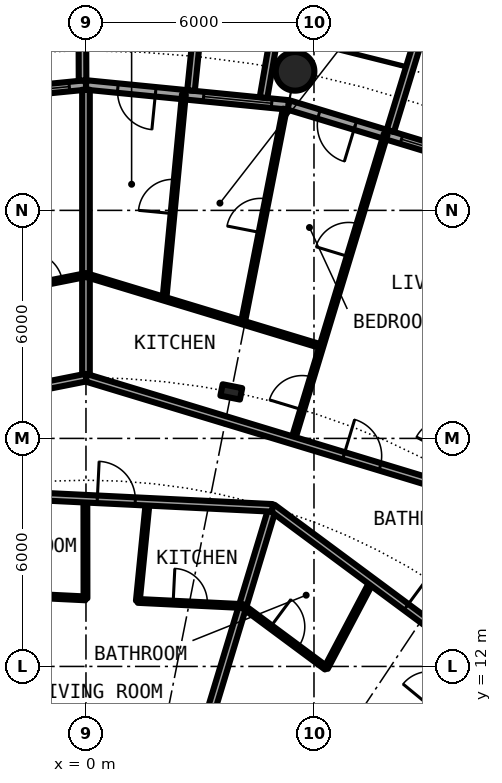
"""IFC4 building model, lengths in metres.
Left out: names, types, materials, properties, quantities, classifications, styles, units other than length and angle.
Written with IfcOpenShell. Run it as: python <this file> out.ifc"""

import sys

from ifc_helpers import new_model, si_unit, direction, frame, frame_2d, origin, origin_2d, place, context, subcontext, project, spatial, rectangle, circle, hollow_circle, i_section, extrude, element, fill, save


model = new_model("IFC4")
c1 = context("Model", 3, precision=1e-05, world=origin(), true_north=direction((0.0, 1.0)))
c2 = subcontext(c1, "Body", "Model", "MODEL_VIEW")
j1 = project(units=[si_unit("LENGTHUNIT", "METRE"), si_unit("PLANEANGLEUNIT", "RADIAN")], contexts=[c1])
p1 = place(None, origin())
s1 = spatial("IfcSite", under=j1, at=p1, CompositionType="ELEMENT")
p2 = place(p1, origin())
s2 = spatial("IfcBuilding", under=s1, at=p2, CompositionType="ELEMENT")
p3 = place(p2, frame((0.0, 0.0, 91.05)))
s3 = spatial("IfcBuildingStorey", under=s2, at=p3, CompositionType="ELEMENT", Elevation=91.05)
p4 = place(p3, frame((5.501, 27.658, 0.0), z_axis=(0.0, 0.0, 1.0), x_axis=(1.0, 0.0, 0.0)))
e1 = element("IfcColumn", 1, at=p4, inside=s3, PredefinedType="COLUMN", context=c2, shape_type="SweptSolid", body=[
    extrude(hollow_circle(Radius=0.508, WallThickness=0.04, at=origin_2d()), origin(), (0.0, 0.0, 1.0), 3.05),
])
p5 = place(p3, frame((3.824, 19.223, 0.0), z_axis=(0.0, 0.0, 1.0), x_axis=(0.195090322016, 0.980785280403, 0.0)))
e2 = element("IfcColumn", 2, at=p5, inside=s3, PredefinedType="COLUMN", context=c2, shape_type="SweptSolid", body=[
    extrude(i_section(OverallWidth=0.306, OverallDepth=0.524, WebThickness=0.021, FlangeThickness=0.04, FilletRadius=0.027, at=origin_2d()), origin(), (0.0, 0.0, 1.0), 3.05),
])
p6 = place(p3, frame((10.447, 25.222, 0.0), z_axis=(0.0, 0.0, 1.0), x_axis=(-0.956965678721, 0.290201119486, 0.0)))
e3 = element("IfcWall", 3, at=p6, inside=s3, PredefinedType="SOLIDWALL", context=c2, shape_type="SweptSolid", body=[
    extrude(rectangle(XDim=5.351, YDim=0.25, at=frame_2d((2.676, 0.0))), origin(), (0.0, 0.0, 1.0), 2.7),
])
p7 = place(p6, frame((0.441, 0.0, 0.3)))
e4 = element("IfcOpeningElement", 4, at=p7, cuts=e3, PredefinedType="OPENING", context=c2, shape_type="SweptSolid", body=[
    extrude(rectangle(XDim=1.8, YDim=2.1, at=frame_2d((0.9, 1.05))), frame((0.0, 0.135, 0.0), z_axis=(0.0, -1.0, 0.0), x_axis=(1.0, 0.0, 0.0)), (0.0, 0.0, 1.0), 0.27),
])
p8 = place(p6, frame((3.51, 0.0, 0.0)))
e5 = element("IfcOpeningElement", 5, at=p8, cuts=e3, PredefinedType="OPENING", context=c2, shape_type="SweptSolid", body=[
    extrude(rectangle(XDim=1.0, YDim=2.2, at=frame_2d((0.5, 1.1))), frame((0.0, 0.135, 0.0), z_axis=(0.0, -1.0, 0.0), x_axis=(1.0, 0.0, 0.0)), (0.0, 0.0, 1.0), 0.27),
])
p9 = place(p3, frame((11.638, 28.084, -0.03), z_axis=(0.0, 0.0, 1.0), x_axis=(-0.941461077774, 0.337121697664, 0.0)))
e6 = element("IfcWall", 6, at=p9, inside=s3, PredefinedType="SOLIDWALL", context=c2, shape_type="SweptSolid", body=[
    extrude(rectangle(XDim=2.993, YDim=0.2, at=frame_2d((1.497, 0.0))), origin(), (0.0, 0.0, 1.0), 2.73),
])
p10 = place(p9, frame((0.457, 0.0, 0.33)))
e7 = element("IfcOpeningElement", 7, at=p10, cuts=e6, PredefinedType="OPENING", context=c2, shape_type="SweptSolid", body=[
    extrude(circle(Radius=1.04, at=frame_2d((1.04, 1.04))), frame((0.0, 0.11, 0.0), z_axis=(0.0, -1.0, 0.0), x_axis=(1.0, 0.0, 0.0)), (0.0, 0.0, 1.0), 0.22),
])
p11 = place(p3, frame((8.009, 26.092, -0.03), z_axis=(0.0, 0.0, 1.0), x_axis=(0.293406695073, 0.955987715029, 0.0)))
e8 = element("IfcWall", 8, at=p11, inside=s3, PredefinedType="SOLIDWALL", context=c2, shape_type="SweptSolid", body=[
    extrude(rectangle(XDim=3.006, YDim=0.2, at=frame_2d((1.503, 0.0))), origin(), (0.0, 0.0, 1.0), 2.73),
])
p12 = place(p3, frame((5.326, 26.775, 0.0), z_axis=(0.0, 0.0, 1.0), x_axis=(-0.995173996315, 0.098126026407, 0.0)))
e9 = element("IfcWall", 9, at=p12, inside=s3, PredefinedType="SOLIDWALL", context=c2, shape_type="SweptSolid", body=[
    extrude(rectangle(XDim=5.352, YDim=0.25, at=frame_2d((2.676, 0.0))), origin(), (0.0, 0.0, 1.0), 2.7),
])
p13 = place(p12, frame((0.441, 0.0, 0.3)))
e10 = element("IfcOpeningElement", 10, at=p13, cuts=e9, PredefinedType="OPENING", context=c2, shape_type="SweptSolid", body=[
    extrude(rectangle(XDim=1.8, YDim=2.1, at=frame_2d((0.9, 1.05))), frame((0.0, 0.135, 0.0), z_axis=(0.0, -1.0, 0.0), x_axis=(1.0, 0.0, 0.0)), (0.0, 0.0, 1.0), 0.27),
])
p14 = place(p12, frame((3.51, 0.0, 0.0)))
e11 = element("IfcOpeningElement", 11, at=p14, cuts=e9, PredefinedType="OPENING", context=c2, shape_type="SweptSolid", body=[
    extrude(rectangle(XDim=1.0, YDim=2.2, at=frame_2d((0.5, 1.1))), frame((0.0, 0.135, 0.0), z_axis=(0.0, -1.0, 0.0), x_axis=(1.0, 0.0, 0.0)), (0.0, 0.0, 1.0), 0.27),
])
p15 = place(p3, frame((4.671, 26.966, -0.03), z_axis=(0.0, 0.0, 1.0), x_axis=(0.170539878907, 0.985350774954, 0.0)))
e12 = element("IfcWall", 12, at=p15, inside=s3, PredefinedType="SOLIDWALL", context=c2, shape_type="SweptSolid", body=[
    extrude(rectangle(XDim=2.932, YDim=0.2, at=frame_2d((1.466, 0.0))), origin(), (0.0, 0.0, 1.0), 2.73),
])
p16 = place(p3, frame((2.764, 27.153, -0.03), z_axis=(0.0, 0.0, 1.0), x_axis=(0.101505487237, 0.994834979311, 0.0)))
e13 = element("IfcWall", 13, at=p16, inside=s3, PredefinedType="SOLIDWALL", context=c2, shape_type="SweptSolid", body=[
    extrude(rectangle(XDim=3.007, YDim=0.2, at=frame_2d((1.503, 0.0))), origin(), (0.0, 0.0, 1.0), 2.73),
])
p17 = place(p3, frame((0.0, 27.3, 0.0), z_axis=(0.0, 0.0, 1.0), x_axis=(-0.995173996315, -0.098126026407, 0.0)))
e14 = element("IfcWall", 14, at=p17, inside=s3, PredefinedType="SOLIDWALL", context=c2, shape_type="SweptSolid", body=[
    extrude(rectangle(XDim=5.352, YDim=0.25, at=frame_2d((2.676, 0.0))), origin(), (0.0, 0.0, 1.0), 2.7),
])
p18 = place(p17, frame((0.441, 0.0, 0.3)))
e15 = element("IfcOpeningElement", 15, at=p18, cuts=e14, PredefinedType="OPENING", context=c2, shape_type="SweptSolid", body=[
    extrude(rectangle(XDim=1.8, YDim=2.1, at=frame_2d((0.9, 1.05))), frame((0.0, 0.135, 0.0), z_axis=(0.0, -1.0, 0.0), x_axis=(1.0, 0.0, 0.0)), (0.0, 0.0, 1.0), 0.27),
])
p19 = place(p17, frame((3.51, 0.0, 0.0)))
e16 = element("IfcOpeningElement", 16, at=p19, cuts=e14, PredefinedType="OPENING", context=c2, shape_type="SweptSolid", body=[
    extrude(rectangle(XDim=1.0, YDim=2.2, at=frame_2d((0.5, 1.1))), frame((0.0, 0.135, 0.0), z_axis=(0.0, -1.0, 0.0), x_axis=(1.0, 0.0, 0.0)), (0.0, 0.0, 1.0), 0.27),
])
p20 = place(p3, frame((-0.09, 27.417, -0.03), z_axis=(0.0, 0.0, 1.0), x_axis=(-0.00347308367, 0.999993968827, 0.0)))
e17 = element("IfcWall", 17, at=p20, inside=s3, PredefinedType="SOLIDWALL", context=c2, shape_type="SweptSolid", body=[
    extrude(rectangle(XDim=2.882, YDim=0.2, at=frame_2d((1.441, 0.0))), origin(), (0.0, 0.0, 1.0), 2.73),
])
p21 = place(p3, frame((-0.013, 13.792, 0.0), z_axis=(0.0, 0.0, 1.0), x_axis=(-0.001210427419, 0.999999267432, 0.0)))
e18 = element("IfcWall", 18, at=p21, inside=s3, PredefinedType="PARTITIONING", context=c2, shape_type="SweptSolid", body=[
    extrude(rectangle(XDim=2.622, YDim=0.1, at=frame_2d((1.311, 0.0))), origin(), (0.0, 0.0, 1.0), 2.7),
])
p22 = place(p3, frame((0.0, 19.6, 0.0), z_axis=(0.0, 0.0, 1.0), x_axis=(0.0, 1.0, 0.0)))
e19 = element("IfcWall", 19, at=p22, inside=s3, PredefinedType="PARTITIONING", context=c2, shape_type="SweptSolid", body=[
    extrude(rectangle(XDim=7.575, YDim=0.2, at=frame_2d((3.788, 0.0))), origin(), (0.0, 0.0, 1.0), 2.7),
])
p23 = place(p3, frame((1.365, 13.724, 0.0), z_axis=(0.0, 0.0, 1.0), x_axis=(0.099171803948, 0.995070325807, 0.0)))
e20 = element("IfcWall", 20, at=p23, inside=s3, PredefinedType="PARTITIONING", context=c2, shape_type="SweptSolid", body=[
    extrude(rectangle(XDim=2.622, YDim=0.1, at=frame_2d((1.311, 0.0))), origin(), (0.0, 0.0, 1.0), 2.7),
])
p24 = place(p3, frame((2.065, 21.674, 0.0), z_axis=(0.0, 0.0, 1.0), x_axis=(0.094751520537, 0.99550095397, 0.0)))
e21 = element("IfcWall", 21, at=p24, inside=s3, PredefinedType="PARTITIONING", context=c2, shape_type="SweptSolid", body=[
    extrude(rectangle(XDim=5.403, YDim=0.1, at=frame_2d((2.702, 0.0))), origin(), (0.0, 0.0, 1.0), 2.7),
])
p25 = place(p24, frame((2.252, 0.0, 0.0)))
e22 = element("IfcOpeningElement", 22, at=p25, cuts=e21, PredefinedType="OPENING", context=c2, shape_type="SweptSolid", body=[
    extrude(rectangle(XDim=0.9, YDim=2.3, at=frame_2d((0.45, 1.15))), frame((0.0, 0.06, 0.0), z_axis=(0.0, -1.0, 0.0), x_axis=(1.0, 0.0, 0.0)), (0.0, 0.0, 1.0), 0.12),
])
p26 = place(p3, frame((2.243, 7.387, 0.0), z_axis=(0.0, 0.0, 1.0), x_axis=(0.290196345171, 0.956967126525, 0.0)))
e23 = element("IfcWall", 23, at=p26, inside=s3, PredefinedType="PARTITIONING", context=c2, shape_type="SweptSolid", body=[
    extrude(rectangle(XDim=9.18, YDim=0.2, at=frame_2d((4.59, 0.0))), origin(), (0.0, 0.0, 1.0), 2.7),
])
p27 = place(p3, frame((4.13, 21.047, 0.0), z_axis=(0.0, 0.0, 1.0), x_axis=(0.192433779325, 0.981309961518, 0.0)))
e24 = element("IfcWall", 24, at=p27, inside=s3, PredefinedType="PARTITIONING", context=c2, shape_type="SweptSolid", body=[
    extrude(rectangle(XDim=5.727, YDim=0.1, at=frame_2d((2.863, 0.0))), origin(), (0.0, 0.0, 1.0), 2.7),
])
p28 = place(p27, frame((2.414, 0.0, 0.0)))
e25 = element("IfcOpeningElement", 25, at=p28, cuts=e24, PredefinedType="OPENING", context=c2, shape_type="SweptSolid", body=[
    extrude(rectangle(XDim=0.9, YDim=2.3, at=frame_2d((0.45, 1.15))), frame((0.0, 0.06, 0.0), z_axis=(0.0, -1.0, 0.0), x_axis=(1.0, 0.0, 0.0)), (0.0, 0.0, 1.0), 0.12),
])
p29 = place(p3, frame((4.909, 5.958, 0.0), z_axis=(0.0, 0.0, 1.0), x_axis=(0.635976043025, 0.771708800454, 0.0)))
e26 = element("IfcWall", 26, at=p29, inside=s3, PredefinedType="PARTITIONING", context=c2, shape_type="SweptSolid", body=[
    extrude(rectangle(XDim=8.213, YDim=0.1, at=frame_2d((4.106, 0.0))), origin(), (0.0, 0.0, 1.0), 2.7),
])
p30 = place(p29, frame((6.49, 0.0, 0.0)))
e27 = element("IfcOpeningElement", 27, at=p30, cuts=e26, PredefinedType="OPENING", context=c2, shape_type="SweptSolid", body=[
    extrude(rectangle(XDim=0.9, YDim=2.3, at=frame_2d((0.45, 1.15))), frame((0.0, 0.06, 0.0), z_axis=(0.0, -1.0, 0.0), x_axis=(1.0, 0.0, 0.0)), (0.0, 0.0, 1.0), 0.12),
])
p31 = place(p29, frame((2.384, 0.0, 0.0)))
e28 = element("IfcOpeningElement", 28, at=p31, cuts=e26, PredefinedType="OPENING", context=c2, shape_type="SweptSolid", body=[
    extrude(rectangle(XDim=0.9, YDim=2.3, at=frame_2d((0.45, 1.15))), frame((0.0, 0.06, 0.0), z_axis=(0.0, -1.0, 0.0), x_axis=(1.0, 0.0, 0.0)), (0.0, 0.0, 1.0), 0.12),
])
p32 = place(p3, frame((5.445, 17.948, 0.0), z_axis=(0.0, 0.0, 1.0), x_axis=(0.290158700753, 0.956978541231, 0.0)))
e29 = element("IfcWall", 29, at=p32, inside=s3, PredefinedType="PARTITIONING", context=c2, shape_type="SweptSolid", body=[
    extrude(rectangle(XDim=8.419, YDim=0.1, at=frame_2d((4.209, 0.0))), origin(), (0.0, 0.0, 1.0), 2.7),
])
p33 = place(p32, frame((0.842, 0.0, 0.0)))
e30 = element("IfcOpeningElement", 30, at=p33, cuts=e29, PredefinedType="OPENING", context=c2, shape_type="SweptSolid", body=[
    extrude(rectangle(XDim=0.9, YDim=2.3, at=frame_2d((0.45, 1.15))), frame((0.0, 0.06, 0.0), z_axis=(0.0, -1.0, 0.0), x_axis=(1.0, 0.0, 0.0)), (0.0, 0.0, 1.0), 0.12),
])
p34 = place(p32, frame((5.052, 0.0, 0.0)))
e31 = element("IfcOpeningElement", 31, at=p34, cuts=e29, PredefinedType="OPENING", context=c2, shape_type="SweptSolid", body=[
    extrude(rectangle(XDim=0.9, YDim=2.3, at=frame_2d((0.45, 1.15))), frame((0.0, 0.06, 0.0), z_axis=(0.0, -1.0, 0.0), x_axis=(1.0, 0.0, 0.0)), (0.0, 0.0, 1.0), 0.12),
])
p35 = place(p3, frame((6.318, 11.96, 0.0), z_axis=(0.0, 0.0, 1.0), x_axis=(0.467001992543, 0.884256263173, 0.0)))
e32 = element("IfcWall", 32, at=p35, inside=s3, PredefinedType="PARTITIONING", context=c2, shape_type="SweptSolid", body=[
    extrude(rectangle(XDim=2.572, YDim=0.1, at=frame_2d((1.286, 0.0))), origin(), (0.0, 0.0, 1.0), 2.7),
])
p36 = place(p3, frame((4.122, 13.589, 0.0), z_axis=(0.0, 0.0, 1.0), x_axis=(0.803128348509, -0.595806055542, 0.0)))
e33 = element("IfcWall", 33, at=p36, inside=s3, PredefinedType="PARTITIONING", context=c2, shape_type="SweptSolid", body=[
    extrude(rectangle(XDim=2.734, YDim=0.1, at=frame_2d((1.367, 0.0))), origin(), (0.0, 0.0, 1.0), 2.7),
])
p37 = place(p36, frame((0.917, 0.0, 0.0)))
e34 = element("IfcOpeningElement", 34, at=p37, cuts=e33, PredefinedType="OPENING", context=c2, shape_type="SweptSolid", body=[
    extrude(rectangle(XDim=0.9, YDim=2.3, at=frame_2d((0.45, 1.15))), frame((0.0, 0.06, 0.0), z_axis=(0.0, -1.0, 0.0), x_axis=(1.0, 0.0, 0.0)), (0.0, 0.0, 1.0), 0.12),
])
p38 = place(p3, frame((-2.77, 13.926, 0.0), z_axis=(0.0, 0.0, 1.0), x_axis=(0.99880320044, -0.048909782152, 0.0)))
e35 = element("IfcWall", 35, at=p38, inside=s3, PredefinedType="PARTITIONING", context=c2, shape_type="SweptSolid", body=[
    extrude(rectangle(XDim=2.76, YDim=0.1, at=frame_2d((1.38, 0.0))), origin(), (0.0, 0.0, 1.0), 2.7),
])
p39 = place(p38, frame((0.93, 0.0, 0.0)))
e36 = element("IfcOpeningElement", 36, at=p39, cuts=e35, PredefinedType="OPENING", context=c2, shape_type="SweptSolid", body=[
    extrude(rectangle(XDim=0.9, YDim=2.3, at=frame_2d((0.45, 1.15))), frame((0.0, 0.06, 0.0), z_axis=(0.0, -1.0, 0.0), x_axis=(1.0, 0.0, 0.0)), (0.0, 0.0, 1.0), 0.12),
])
p40 = place(p3, frame((1.365, 13.724, 0.0), z_axis=(0.0, 0.0, 1.0), x_axis=(0.99880320044, -0.048909782152, 0.0)))
e37 = element("IfcWall", 37, at=p40, inside=s3, PredefinedType="PARTITIONING", context=c2, shape_type="SweptSolid", body=[
    extrude(rectangle(XDim=2.76, YDim=0.1, at=frame_2d((1.38, 0.0))), origin(), (0.0, 0.0, 1.0), 2.7),
])
p41 = place(p40, frame((0.93, 0.0, 0.0)))
e38 = element("IfcOpeningElement", 38, at=p41, cuts=e37, PredefinedType="OPENING", context=c2, shape_type="SweptSolid", body=[
    extrude(rectangle(XDim=0.9, YDim=2.3, at=frame_2d((0.45, 1.15))), frame((0.0, 0.06, 0.0), z_axis=(0.0, -1.0, 0.0), x_axis=(1.0, 0.0, 0.0)), (0.0, 0.0, 1.0), 0.12),
])
p42 = place(p3, frame((4.906, 16.172, 0.0), z_axis=(0.0, 0.0, 1.0), x_axis=(0.803191461888, -0.595720971219, 0.0)))
e39 = element("IfcWall", 39, at=p42, inside=s3, PredefinedType="PARTITIONING", context=c2, shape_type="SweptSolid", body=[
    extrude(rectangle(XDim=9.76, YDim=0.2, at=frame_2d((4.88, 0.0))), origin(), (0.0, 0.0, 1.0), 2.7),
])
p43 = place(p42, frame((4.38, 0.0, 0.0)))
e40 = element("IfcOpeningElement", 40, at=p43, cuts=e39, PredefinedType="OPENING", context=c2, shape_type="SweptSolid", body=[
    extrude(rectangle(XDim=1.0, YDim=2.3, at=frame_2d((0.5, 1.15))), frame((0.0, 0.11, 0.0), z_axis=(0.0, -1.0, 0.0), x_axis=(1.0, 0.0, 0.0)), (0.0, 0.0, 1.0), 0.22),
])
p44 = place(p3, frame((-3.298, 16.574, 0.0), z_axis=(0.0, 0.0, 1.0), x_axis=(0.998802523271, -0.048923608895, 0.0)))
e41 = element("IfcWall", 41, at=p44, inside=s3, PredefinedType="PARTITIONING", context=c2, shape_type="SweptSolid", body=[
    extrude(rectangle(XDim=8.214, YDim=0.2, at=frame_2d((4.107, 0.0))), origin(), (0.0, 0.0, 1.0), 2.7),
])
p45 = place(p44, frame((3.6, 0.0, 0.0)))
e42 = element("IfcOpeningElement", 42, at=p45, cuts=e41, PredefinedType="OPENING", context=c2, shape_type="SweptSolid", body=[
    extrude(rectangle(XDim=1.0, YDim=2.3, at=frame_2d((0.5, 1.15))), frame((0.0, 0.11, 0.0), z_axis=(0.0, -1.0, 0.0), x_axis=(1.0, 0.0, 0.0)), (0.0, 0.0, 1.0), 0.22),
])
p46 = place(p3, frame((-0.007, 19.599, 0.0), z_axis=(0.0, 0.0, 1.0), x_axis=(0.95700958731, -0.290056287291, 0.0)))
e43 = element("IfcWall", 43, at=p46, inside=s3, PredefinedType="PARTITIONING", context=c2, shape_type="SweptSolid", body=[
    extrude(rectangle(XDim=11.226, YDim=0.2, at=frame_2d((5.613, 0.0))), origin(), (0.0, 0.0, 1.0), 2.38),
])
p47 = place(p46, frame((7.093, 0.0, 0.0)))
e44 = element("IfcOpeningElement", 44, at=p47, cuts=e43, PredefinedType="OPENING", context=c2, shape_type="SweptSolid", body=[
    extrude(rectangle(XDim=1.0, YDim=2.3, at=frame_2d((0.5, 1.15))), frame((0.0, 0.11, 0.0), z_axis=(0.0, -1.0, 0.0), x_axis=(1.0, 0.0, 0.0)), (0.0, 0.0, 1.0), 0.22),
])
p48 = place(p3, frame((-7.501, 18.108, 0.0), z_axis=(0.0, 0.0, 1.0), x_axis=(0.980791233058, 0.195060393611, 0.0)))
e45 = element("IfcWall", 45, at=p48, inside=s3, PredefinedType="PARTITIONING", context=c2, shape_type="SweptSolid", body=[
    extrude(rectangle(XDim=7.65, YDim=0.2, at=frame_2d((3.825, 0.0))), origin(), (0.0, 0.0, 1.0), 2.38),
])
p49 = place(p48, frame((4.313, 0.0, 0.0)))
e46 = element("IfcOpeningElement", 46, at=p49, cuts=e45, PredefinedType="OPENING", context=c2, shape_type="SweptSolid", body=[
    extrude(rectangle(XDim=1.0, YDim=2.3, at=frame_2d((0.5, 1.15))), frame((0.0, 0.11, 0.0), z_axis=(0.0, -1.0, 0.0), x_axis=(1.0, 0.0, 0.0)), (0.0, 0.0, 1.0), 0.22),
])
p50 = place(p3, frame((-0.004, 22.299, 0.0), z_axis=(0.0, 0.0, 1.0), x_axis=(0.95699555343, -0.290102586537, 0.0)))
e47 = element("IfcWall", 47, at=p50, inside=s3, PredefinedType="PARTITIONING", context=c2, shape_type="SweptSolid", body=[
    extrude(rectangle(XDim=6.478, YDim=0.1, at=frame_2d((3.239, 0.0))), origin(), (0.0, 0.0, 1.0), 2.7),
])
p51 = place(p3, frame((-4.261, 21.452, 0.0), z_axis=(0.0, 0.0, 1.0), x_axis=(0.980819753929, 0.194916931799, 0.0)))
e48 = element("IfcWall", 48, at=p51, inside=s3, PredefinedType="PARTITIONING", context=c2, shape_type="SweptSolid", body=[
    extrude(rectangle(XDim=4.346, YDim=0.1, at=frame_2d((2.173, 0.0))), origin(), (0.0, 0.0, 1.0), 2.7),
])
p52 = place(p51, frame((2.807, 0.0, 0.0)))
e49 = element("IfcOpeningElement", 49, at=p52, cuts=e48, PredefinedType="OPENING", context=c2, shape_type="SweptSolid", body=[
    extrude(rectangle(XDim=0.9, YDim=2.3, at=frame_2d((0.45, 1.15))), frame((0.0, 0.06, 0.0), z_axis=(0.0, -1.0, 0.0), x_axis=(1.0, 0.0, 0.0)), (0.0, 0.0, 1.0), 0.12),
])
p53 = place(p7, origin())
e50 = element("IfcWindow", 50, at=p53, inside=s3, PartitioningType="SINGLE_PANEL", PredefinedType="WINDOW", context=c2, shape_type="SweptSolid", body=[
    extrude(rectangle(XDim=1.8, YDim=2.1, at=frame_2d((0.9, 1.05))), frame((0.0, 0.03, 0.0), z_axis=(0.0, -1.0, 0.0), x_axis=(1.0, 0.0, 0.0)), (0.0, 0.0, 1.0), 0.06),
])
fill(e4, e50)
p54 = place(p8, origin())
e51 = element("IfcDoor", 51, at=p54, inside=s3, OperationType="SINGLE_SWING_LEFT", PredefinedType="DOOR", context=c2, shape_type="SweptSolid", body=[
    extrude(rectangle(XDim=1.0, YDim=2.2, at=frame_2d((0.5, 1.1))), frame((0.0, 0.025, 0.0), z_axis=(0.0, -1.0, 0.0), x_axis=(1.0, 0.0, 0.0)), (0.0, 0.0, 1.0), 0.05),
])
fill(e5, e51)
p55 = place(p13, origin())
e52 = element("IfcWindow", 52, at=p55, inside=s3, PartitioningType="SINGLE_PANEL", PredefinedType="WINDOW", context=c2, shape_type="SweptSolid", body=[
    extrude(rectangle(XDim=1.8, YDim=2.1, at=frame_2d((0.9, 1.05))), frame((0.0, 0.03, 0.0), z_axis=(0.0, -1.0, 0.0), x_axis=(1.0, 0.0, 0.0)), (0.0, 0.0, 1.0), 0.06),
])
fill(e10, e52)
p56 = place(p14, origin())
e53 = element("IfcDoor", 53, at=p56, inside=s3, OperationType="SINGLE_SWING_LEFT", PredefinedType="DOOR", context=c2, shape_type="SweptSolid", body=[
    extrude(rectangle(XDim=1.0, YDim=2.2, at=frame_2d((0.5, 1.1))), frame((0.0, 0.025, 0.0), z_axis=(0.0, -1.0, 0.0), x_axis=(1.0, 0.0, 0.0)), (0.0, 0.0, 1.0), 0.05),
])
fill(e11, e53)
p57 = place(p18, origin())
e54 = element("IfcWindow", 54, at=p57, inside=s3, PartitioningType="SINGLE_PANEL", PredefinedType="WINDOW", context=c2, shape_type="SweptSolid", body=[
    extrude(rectangle(XDim=1.8, YDim=2.1, at=frame_2d((0.9, 1.05))), frame((0.0, 0.03, 0.0), z_axis=(0.0, -1.0, 0.0), x_axis=(1.0, 0.0, 0.0)), (0.0, 0.0, 1.0), 0.06),
])
fill(e15, e54)
p58 = place(p47, origin())
e55 = element("IfcDoor", 55, at=p58, inside=s3, OperationType="SINGLE_SWING_RIGHT", PredefinedType="DOOR", context=c2, shape_type="SweptSolid", body=[
    extrude(rectangle(XDim=1.0, YDim=2.3, at=frame_2d((0.5, 1.15))), frame((0.0, 0.025, 0.0), z_axis=(0.0, -1.0, 0.0), x_axis=(1.0, 0.0, 0.0)), (0.0, 0.0, 1.0), 0.05),
])
fill(e44, e55)
p59 = place(p33, origin())
e56 = element("IfcDoor", 56, at=p59, inside=s3, OperationType="SINGLE_SWING_LEFT", PredefinedType="DOOR", context=c2, shape_type="SweptSolid", body=[
    extrude(rectangle(XDim=0.9, YDim=2.3, at=frame_2d((0.45, 1.15))), frame((0.0, 0.025, 0.0), z_axis=(0.0, -1.0, 0.0), x_axis=(1.0, 0.0, 0.0)), (0.0, 0.0, 1.0), 0.05),
])
fill(e30, e56)
p60 = place(p34, origin())
e57 = element("IfcDoor", 57, at=p60, inside=s3, OperationType="SINGLE_SWING_RIGHT", PredefinedType="DOOR", context=c2, shape_type="SweptSolid", body=[
    extrude(rectangle(XDim=0.9, YDim=2.3, at=frame_2d((0.45, 1.15))), frame((0.0, 0.025, 0.0), z_axis=(0.0, -1.0, 0.0), x_axis=(1.0, 0.0, 0.0)), (0.0, 0.0, 1.0), 0.05),
])
fill(e31, e57)
p61 = place(p28, origin())
e58 = element("IfcDoor", 58, at=p61, inside=s3, OperationType="SINGLE_SWING_RIGHT", PredefinedType="DOOR", context=c2, shape_type="SweptSolid", body=[
    extrude(rectangle(XDim=0.9, YDim=2.3, at=frame_2d((0.45, 1.15))), frame((0.0, 0.025, 0.0), z_axis=(0.0, -1.0, 0.0), x_axis=(1.0, 0.0, 0.0)), (0.0, 0.0, 1.0), 0.05),
])
fill(e25, e58)
p62 = place(p25, origin())
e59 = element("IfcDoor", 59, at=p62, inside=s3, OperationType="SINGLE_SWING_LEFT", PredefinedType="DOOR", context=c2, shape_type="SweptSolid", body=[
    extrude(rectangle(XDim=0.9, YDim=2.3, at=frame_2d((0.45, 1.15))), frame((0.0, 0.025, 0.0), z_axis=(0.0, -1.0, 0.0), x_axis=(1.0, 0.0, 0.0)), (0.0, 0.0, 1.0), 0.05),
])
fill(e22, e59)
p63 = place(p52, origin())
e60 = element("IfcDoor", 60, at=p63, inside=s3, OperationType="SINGLE_SWING_RIGHT", PredefinedType="DOOR", context=c2, shape_type="SweptSolid", body=[
    extrude(rectangle(XDim=0.9, YDim=2.3, at=frame_2d((0.45, 1.15))), frame((0.0, 0.025, 0.0), z_axis=(0.0, -1.0, 0.0), x_axis=(1.0, 0.0, 0.0)), (0.0, 0.0, 1.0), 0.05),
])
fill(e49, e60)
p64 = place(p43, origin())
e61 = element("IfcDoor", 61, at=p64, inside=s3, OperationType="SINGLE_SWING_LEFT", PredefinedType="DOOR", context=c2, shape_type="SweptSolid", body=[
    extrude(rectangle(XDim=1.0, YDim=2.3, at=frame_2d((0.5, 1.15))), frame((0.0, 0.025, 0.0), z_axis=(0.0, -1.0, 0.0), x_axis=(1.0, 0.0, 0.0)), (0.0, 0.0, 1.0), 0.05),
])
fill(e40, e61)
p65 = place(p37, origin())
e62 = element("IfcDoor", 62, at=p65, inside=s3, OperationType="SINGLE_SWING_LEFT", PredefinedType="DOOR", context=c2, shape_type="SweptSolid", body=[
    extrude(rectangle(XDim=0.9, YDim=2.3, at=frame_2d((0.45, 1.15))), frame((0.0, 0.025, 0.0), z_axis=(0.0, -1.0, 0.0), x_axis=(1.0, 0.0, 0.0)), (0.0, 0.0, 1.0), 0.05),
])
fill(e34, e62)
p66 = place(p45, origin())
e63 = element("IfcDoor", 63, at=p66, inside=s3, OperationType="SINGLE_SWING_LEFT", PredefinedType="DOOR", context=c2, shape_type="SweptSolid", body=[
    extrude(rectangle(XDim=1.0, YDim=2.3, at=frame_2d((0.5, 1.15))), frame((0.0, 0.025, 0.0), z_axis=(0.0, -1.0, 0.0), x_axis=(1.0, 0.0, 0.0)), (0.0, 0.0, 1.0), 0.05),
])
fill(e42, e63)
p67 = place(p41, origin())
e64 = element("IfcDoor", 64, at=p67, inside=s3, OperationType="SINGLE_SWING_RIGHT", PredefinedType="DOOR", context=c2, shape_type="SweptSolid", body=[
    extrude(rectangle(XDim=0.9, YDim=2.3, at=frame_2d((0.45, 1.15))), frame((0.0, 0.025, 0.0), z_axis=(0.0, -1.0, 0.0), x_axis=(1.0, 0.0, 0.0)), (0.0, 0.0, 1.0), 0.05),
])
fill(e38, e64)
save(model, sys.argv[1])
